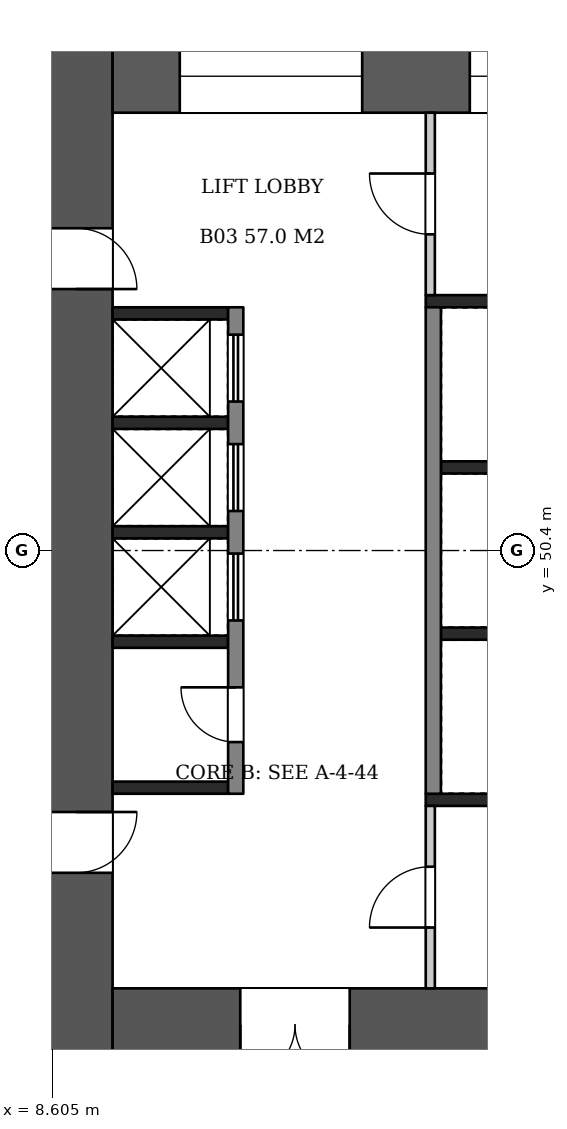
"""IFC4 building model, lengths in metres.
Left out: names, types, materials, properties, quantities, classifications, styles, units other than length and angle.
Written with IfcOpenShell. Run it as: python <this file> out.ifc"""

import sys

from ifc_helpers import new_model, si_unit, direction, frame, frame_2d, origin, place, context, subcontext, project, spatial, rectangle, extrude, element, fill, save


model = new_model("IFC4")
c1 = context("Model", 3, precision=1e-05, world=origin(), true_north=direction((0.0, 1.0)))
c2 = subcontext(c1, "Body", "Model", "MODEL_VIEW")
j1 = project(units=[si_unit("LENGTHUNIT", "METRE"), si_unit("PLANEANGLEUNIT", "RADIAN")], contexts=[c1])
p1 = place(None, origin())
s1 = spatial("IfcSite", under=j1, at=p1, CompositionType="ELEMENT")
p2 = place(p1, origin())
s2 = spatial("IfcBuilding", under=s1, at=p2, CompositionType="ELEMENT")
p3 = place(p2, frame((0.0, 0.0, 19.8)))
s3 = spatial("IfcBuildingStorey", under=s2, at=p3, CompositionType="ELEMENT", Elevation=19.8)
p4 = place(p3, frame((9.0, 58.8, 0.0), z_axis=(0.0, 0.0, 1.0), x_axis=(0.0, -1.0, 0.0)))
e1 = element("IfcWall", 1, at=p4, inside=s3, PredefinedType="SHEAR", context=c2, shape_type="SweptSolid", body=[
    extrude(rectangle(XDim=16.8, YDim=1.2, at=frame_2d((8.4, 0.0))), origin(), (0.0, 0.0, 1.0), 5.12),
])
p5 = place(p4, frame((3.1, 0.0, 0.0)))
e2 = element("IfcOpeningElement", 2, at=p5, cuts=e1, PredefinedType="OPENING", context=c2, shape_type="SweptSolid", body=[
    extrude(rectangle(XDim=1.0, YDim=2.1, at=frame_2d((0.5, 1.05))), frame((0.0, 0.61, 0.0), z_axis=(0.0, -1.0, 0.0), x_axis=(1.0, 0.0, 0.0)), (0.0, 0.0, 1.0), 1.22),
])
p6 = place(p4, frame((12.7, 0.0, 0.0)))
e3 = element("IfcOpeningElement", 3, at=p6, cuts=e1, PredefinedType="OPENING", context=c2, shape_type="SweptSolid", body=[
    extrude(rectangle(XDim=1.0, YDim=2.1, at=frame_2d((0.5, 1.05))), frame((0.0, 0.61, 0.0), z_axis=(0.0, -1.0, 0.0), x_axis=(1.0, 0.0, 0.0)), (0.0, 0.0, 1.0), 1.22),
])
p7 = place(p3, frame((9.6, 58.2, 0.0), z_axis=(0.0, 0.0, 1.0), x_axis=(1.0, 0.0, 0.0)))
e4 = element("IfcWall", 4, at=p7, inside=s3, PredefinedType="SHEAR", context=c2, shape_type="SweptSolid", body=[
    extrude(rectangle(XDim=14.4, YDim=1.2, at=frame_2d((7.2, 0.0))), origin(), (0.0, 0.0, 1.0), 5.12),
])
p8 = place(p7, frame((1.105, 0.0, 0.6)))
e5 = element("IfcOpeningElement", 5, at=p8, cuts=e4, PredefinedType="OPENING", context=c2, shape_type="SweptSolid", body=[
    extrude(rectangle(XDim=3.0, YDim=2.1, at=frame_2d((1.5, 1.05))), frame((0.0, 0.61, 0.0), z_axis=(0.0, -1.0, 0.0), x_axis=(1.0, 0.0, 0.0)), (0.0, 0.0, 1.0), 1.22),
])
p9 = place(p7, frame((5.875, 0.0, 0.6)))
e6 = element("IfcOpeningElement", 6, at=p9, cuts=e4, PredefinedType="OPENING", context=c2, shape_type="SweptSolid", body=[
    extrude(rectangle(XDim=2.4, YDim=2.1, at=frame_2d((1.2, 1.05))), frame((0.0, 0.61, 0.0), z_axis=(0.0, -1.0, 0.0), x_axis=(1.0, 0.0, 0.0)), (0.0, 0.0, 1.0), 1.22),
])
p10 = place(p7, frame((9.993, 0.0, 0.5)))
e7 = element("IfcOpeningElement", 7, at=p10, cuts=e4, PredefinedType="OPENING", context=c2, shape_type="SweptSolid", body=[
    extrude(rectangle(XDim=1.2, YDim=2.4, at=frame_2d((0.6, 1.2))), frame((0.0, 0.61, 0.0), z_axis=(0.0, -1.0, 0.0), x_axis=(1.0, 0.0, 0.0)), (0.0, 0.0, 1.0), 1.22),
])
p11 = place(p7, frame((12.197, 0.0, 0.5)))
e8 = element("IfcOpeningElement", 8, at=p11, cuts=e4, PredefinedType="OPENING", context=c2, shape_type="SweptSolid", body=[
    extrude(rectangle(XDim=1.2, YDim=2.4, at=frame_2d((0.6, 1.2))), frame((0.0, 0.61, 0.0), z_axis=(0.0, -1.0, 0.0), x_axis=(1.0, 0.0, 0.0)), (0.0, 0.0, 1.0), 1.22),
])
p12 = place(p3, frame((9.6, 42.6, 0.0), z_axis=(0.0, 0.0, 1.0), x_axis=(1.0, 0.0, 0.0)))
e9 = element("IfcWall", 9, at=p12, inside=s3, PredefinedType="SHEAR", context=c2, shape_type="SweptSolid", body=[
    extrude(rectangle(XDim=14.4, YDim=1.2, at=frame_2d((7.2, 0.0))), origin(), (0.0, 0.0, 1.0), 5.12),
])
p13 = place(p12, frame((2.1, 0.0, 0.0)))
e10 = element("IfcOpeningElement", 10, at=p13, cuts=e9, PredefinedType="OPENING", context=c2, shape_type="SweptSolid", body=[
    extrude(rectangle(XDim=1.8, YDim=2.1, at=frame_2d((0.9, 1.05))), frame((0.0, 0.61, 0.0), z_axis=(0.0, -1.0, 0.0), x_axis=(1.0, 0.0, 0.0)), (0.0, 0.0, 1.0), 1.22),
])
for number, where, z_axis, x_axis in (
    (11, (9.6, 54.3, 0.0), (0.0, 0.0, 1.0), (1.0, 0.0, 0.0)),
    (12, (9.6, 52.5, 0.0), (0.0, 0.0, 1.0), (1.0, 0.0, 0.0)),
    (13, (9.6, 50.7, 0.0), (0.0, 0.0, 1.0), (1.0, 0.0, 0.0)),
    (14, (9.6, 48.9, 0.0), (0.0, 0.0, 1.0), (1.0, 0.0, 0.0)),
    (15, (9.6, 46.5, 0.0), (0.0, 0.0, 1.0), (1.0, 0.0, 0.0)),
):
    element("IfcWall", number, at=place(p3, frame(where, z_axis=z_axis, x_axis=x_axis)), inside=s3, PredefinedType="SHEAR", context=c2, shape_type="SweptSolid", body=[
        extrude(rectangle(XDim=1.9, YDim=0.2, at=frame_2d((0.95, 0.0))), origin(), (0.0, 0.0, 1.0), 5.12),
    ])
p14 = place(p3, frame((11.625, 54.4, 0.0), z_axis=(0.0, 0.0, 1.0), x_axis=(0.0, -1.0, 0.0)))
e16 = element("IfcWall", 16, at=p14, inside=s3, PredefinedType="SHEAR", context=c2, shape_type="SweptSolid", body=[
    extrude(rectangle(XDim=8.0, YDim=0.25, at=frame_2d((4.0, 0.0))), origin(), (0.0, 0.0, 1.0), 5.12),
])
p15 = place(p14, frame((0.45, 0.0, 0.0)))
e17 = element("IfcOpeningElement", 17, at=p15, cuts=e16, PredefinedType="OPENING", context=c2, shape_type="SweptSolid", body=[
    extrude(rectangle(XDim=1.1, YDim=2.1, at=frame_2d((0.55, 1.05))), frame((0.0, 0.135, 0.0), z_axis=(0.0, -1.0, 0.0), x_axis=(1.0, 0.0, 0.0)), (0.0, 0.0, 1.0), 0.27),
])
p16 = place(p14, frame((2.25, 0.0, 0.0)))
e18 = element("IfcOpeningElement", 18, at=p16, cuts=e16, PredefinedType="OPENING", context=c2, shape_type="SweptSolid", body=[
    extrude(rectangle(XDim=1.1, YDim=2.1, at=frame_2d((0.55, 1.05))), frame((0.0, 0.135, 0.0), z_axis=(0.0, -1.0, 0.0), x_axis=(1.0, 0.0, 0.0)), (0.0, 0.0, 1.0), 0.27),
])
p17 = place(p14, frame((4.05, 0.0, 0.0)))
e19 = element("IfcOpeningElement", 19, at=p17, cuts=e16, PredefinedType="OPENING", context=c2, shape_type="SweptSolid", body=[
    extrude(rectangle(XDim=1.1, YDim=2.1, at=frame_2d((0.55, 1.05))), frame((0.0, 0.135, 0.0), z_axis=(0.0, -1.0, 0.0), x_axis=(1.0, 0.0, 0.0)), (0.0, 0.0, 1.0), 0.27),
])
p18 = place(p14, frame((6.25, 0.0, 0.0)))
e20 = element("IfcOpeningElement", 20, at=p18, cuts=e16, PredefinedType="OPENING", context=c2, shape_type="SweptSolid", body=[
    extrude(rectangle(XDim=0.9, YDim=2.1, at=frame_2d((0.45, 1.05))), frame((0.0, 0.135, 0.0), z_axis=(0.0, -1.0, 0.0), x_axis=(1.0, 0.0, 0.0)), (0.0, 0.0, 1.0), 0.27),
])
for number, where, z_axis, x_axis in (
    (21, (15.0, 51.767, 0.0), (0.0, 0.0, 1.0), (1.0, 0.0, 0.0)),
    (22, (15.0, 49.033, 0.0), (0.0, 0.0, 1.0), (1.0, 0.0, 0.0)),
):
    element("IfcWall", number, at=place(p3, frame(where, z_axis=z_axis, x_axis=x_axis)), inside=s3, PredefinedType="SHEAR", context=c2, shape_type="SweptSolid", body=[
        extrude(rectangle(XDim=1.9, YDim=0.2, at=frame_2d((0.95, 0.0))), origin(), (0.0, 0.0, 1.0), 5.12),
    ])
p19 = place(p3, frame((14.875, 54.4, 0.0), z_axis=(0.0, 0.0, 1.0), x_axis=(0.0, -1.0, 0.0)))
e23 = element("IfcWall", 23, at=p19, inside=s3, PredefinedType="SHEAR", context=c2, shape_type="SweptSolid", body=[
    extrude(rectangle(XDim=8.0, YDim=0.25, at=frame_2d((4.0, 0.0))), origin(), (0.0, 0.0, 1.0), 5.12),
])
p20 = place(p3, frame((14.75, 54.5, 0.0), z_axis=(0.0, 0.0, 1.0), x_axis=(1.0, 0.0, 0.0)))
e24 = element("IfcWall", 24, at=p20, inside=s3, PredefinedType="SHEAR", context=c2, shape_type="SweptSolid", body=[
    extrude(rectangle(XDim=2.4, YDim=0.2, at=frame_2d((1.2, 0.0))), origin(), (0.0, 0.0, 1.0), 5.12),
])
p21 = place(p3, frame((14.825, 57.6, 0.0), z_axis=(0.0, 0.0, 1.0), x_axis=(0.0, -1.0, 0.0)))
e25 = element("IfcWall", 25, at=p21, inside=s3, PredefinedType="PARTITIONING", context=c2, shape_type="SweptSolid", body=[
    extrude(rectangle(XDim=3.0, YDim=0.15, at=frame_2d((1.5, 0.0))), origin(), (0.0, 0.0, 1.0), 5.12),
])
p22 = place(p21, frame((1.0, 0.0, 0.0)))
e26 = element("IfcOpeningElement", 26, at=p22, cuts=e25, PredefinedType="OPENING", context=c2, shape_type="SweptSolid", body=[
    extrude(rectangle(XDim=1.0, YDim=2.1, at=frame_2d((0.5, 1.05))), frame((0.0, 0.085, 0.0), z_axis=(0.0, -1.0, 0.0), x_axis=(1.0, 0.0, 0.0)), (0.0, 0.0, 1.0), 0.17),
])
p23 = place(p3, frame((14.75, 46.3, 0.0), z_axis=(0.0, 0.0, 1.0), x_axis=(1.0, 0.0, 0.0)))
e27 = element("IfcWall", 27, at=p23, inside=s3, PredefinedType="SHEAR", context=c2, shape_type="SweptSolid", body=[
    extrude(rectangle(XDim=2.4, YDim=0.2, at=frame_2d((1.2, 0.0))), origin(), (0.0, 0.0, 1.0), 5.12),
])
p24 = place(p3, frame((14.825, 46.2, 0.0), z_axis=(0.0, 0.0, 1.0), x_axis=(0.0, -1.0, 0.0)))
e28 = element("IfcWall", 28, at=p24, inside=s3, PredefinedType="PARTITIONING", context=c2, shape_type="SweptSolid", body=[
    extrude(rectangle(XDim=3.0, YDim=0.15, at=frame_2d((1.5, 0.0))), origin(), (0.0, 0.0, 1.0), 5.12),
])
p25 = place(p24, frame((1.0, 0.0, 0.0)))
e29 = element("IfcOpeningElement", 29, at=p25, cuts=e28, PredefinedType="OPENING", context=c2, shape_type="SweptSolid", body=[
    extrude(rectangle(XDim=1.0, YDim=2.1, at=frame_2d((0.5, 1.05))), frame((0.0, 0.085, 0.0), z_axis=(0.0, -1.0, 0.0), x_axis=(1.0, 0.0, 0.0)), (0.0, 0.0, 1.0), 0.17),
])
p26 = place(p5, origin())
e30 = element("IfcDoor", 30, at=p26, inside=s3, OperationType="SINGLE_SWING_RIGHT", PredefinedType="DOOR", context=c2, shape_type="SweptSolid", body=[
    extrude(rectangle(XDim=1.0, YDim=2.1, at=frame_2d((0.5, 1.05))), frame((0.0, 0.025, 0.0), z_axis=(0.0, -1.0, 0.0), x_axis=(1.0, 0.0, 0.0)), (0.0, 0.0, 1.0), 0.05),
])
fill(e2, e30)
p27 = place(p6, origin())
e31 = element("IfcDoor", 31, at=p27, inside=s3, OperationType="SINGLE_SWING_LEFT", PredefinedType="DOOR", context=c2, shape_type="SweptSolid", body=[
    extrude(rectangle(XDim=1.0, YDim=2.1, at=frame_2d((0.5, 1.05))), frame((0.0, 0.025, 0.0), z_axis=(0.0, -1.0, 0.0), x_axis=(1.0, 0.0, 0.0)), (0.0, 0.0, 1.0), 0.05),
])
fill(e3, e31)
p28 = place(p13, frame((1.8, 0.0, 0.0), z_axis=(0.0, 0.0, 1.0), x_axis=(-1.0, 0.0, 0.0)))
e32 = element("IfcDoor", 32, at=p28, inside=s3, OperationType="DOUBLE_DOOR_SINGLE_SWING", PredefinedType="DOOR", context=c2, shape_type="SweptSolid", body=[
    extrude(rectangle(XDim=1.8, YDim=2.1, at=frame_2d((0.9, 1.05))), frame((0.0, 0.025, 0.0), z_axis=(0.0, -1.0, 0.0), x_axis=(1.0, 0.0, 0.0)), (0.0, 0.0, 1.0), 0.05),
])
fill(e10, e32)
p29 = place(p15, origin())
e33 = element("IfcDoor", 33, at=p29, inside=s3, OperationType="DOUBLE_DOOR_SLIDING", PredefinedType="DOOR", context=c2, shape_type="SweptSolid", body=[
    extrude(rectangle(XDim=1.1, YDim=2.1, at=frame_2d((0.55, 1.05))), frame((0.0, 0.025, 0.0), z_axis=(0.0, -1.0, 0.0), x_axis=(1.0, 0.0, 0.0)), (0.0, 0.0, 1.0), 0.05),
])
fill(e17, e33)
p30 = place(p16, origin())
e34 = element("IfcDoor", 34, at=p30, inside=s3, OperationType="DOUBLE_DOOR_SLIDING", PredefinedType="DOOR", context=c2, shape_type="SweptSolid", body=[
    extrude(rectangle(XDim=1.1, YDim=2.1, at=frame_2d((0.55, 1.05))), frame((0.0, 0.025, 0.0), z_axis=(0.0, -1.0, 0.0), x_axis=(1.0, 0.0, 0.0)), (0.0, 0.0, 1.0), 0.05),
])
fill(e18, e34)
p31 = place(p17, origin())
e35 = element("IfcDoor", 35, at=p31, inside=s3, OperationType="DOUBLE_DOOR_SLIDING", PredefinedType="DOOR", context=c2, shape_type="SweptSolid", body=[
    extrude(rectangle(XDim=1.1, YDim=2.1, at=frame_2d((0.55, 1.05))), frame((0.0, 0.025, 0.0), z_axis=(0.0, -1.0, 0.0), x_axis=(1.0, 0.0, 0.0)), (0.0, 0.0, 1.0), 0.05),
])
fill(e19, e35)
p32 = place(p18, frame((0.9, 0.0, 0.0), z_axis=(0.0, 0.0, 1.0), x_axis=(-1.0, 0.0, 0.0)))
e36 = element("IfcDoor", 36, at=p32, inside=s3, OperationType="SINGLE_SWING_RIGHT", PredefinedType="DOOR", context=c2, shape_type="SweptSolid", body=[
    extrude(rectangle(XDim=0.9, YDim=2.1, at=frame_2d((0.45, 1.05))), frame((0.0, 0.025, 0.0), z_axis=(0.0, -1.0, 0.0), x_axis=(1.0, 0.0, 0.0)), (0.0, 0.0, 1.0), 0.05),
])
fill(e20, e36)
p33 = place(p22, frame((1.0, 0.0, 0.0), z_axis=(0.0, 0.0, 1.0), x_axis=(-1.0, 0.0, 0.0)))
e37 = element("IfcDoor", 37, at=p33, inside=s3, OperationType="SINGLE_SWING_RIGHT", PredefinedType="DOOR", context=c2, shape_type="SweptSolid", body=[
    extrude(rectangle(XDim=1.0, YDim=2.1, at=frame_2d((0.5, 1.05))), frame((0.0, 0.025, 0.0), z_axis=(0.0, -1.0, 0.0), x_axis=(1.0, 0.0, 0.0)), (0.0, 0.0, 1.0), 0.05),
])
fill(e26, e37)
p34 = place(p25, frame((1.0, 0.0, 0.0), z_axis=(0.0, 0.0, 1.0), x_axis=(-1.0, 0.0, 0.0)))
e38 = element("IfcDoor", 38, at=p34, inside=s3, OperationType="SINGLE_SWING_LEFT", PredefinedType="DOOR", context=c2, shape_type="SweptSolid", body=[
    extrude(rectangle(XDim=1.0, YDim=2.1, at=frame_2d((0.5, 1.05))), frame((0.0, 0.025, 0.0), z_axis=(0.0, -1.0, 0.0), x_axis=(1.0, 0.0, 0.0)), (0.0, 0.0, 1.0), 0.05),
])
fill(e29, e38)
p35 = place(p8, origin())
e39 = element("IfcWindow", 39, at=p35, inside=s3, PartitioningType="SINGLE_PANEL", PredefinedType="WINDOW", context=c2, shape_type="SweptSolid", body=[
    extrude(rectangle(XDim=3.0, YDim=2.1, at=frame_2d((1.5, 1.05))), frame((0.0, 0.03, 0.0), z_axis=(0.0, -1.0, 0.0), x_axis=(1.0, 0.0, 0.0)), (0.0, 0.0, 1.0), 0.06),
])
fill(e5, e39)
p36 = place(p9, origin())
e40 = element("IfcWindow", 40, at=p36, inside=s3, PartitioningType="SINGLE_PANEL", PredefinedType="WINDOW", context=c2, shape_type="SweptSolid", body=[
    extrude(rectangle(XDim=2.4, YDim=2.1, at=frame_2d((1.2, 1.05))), frame((0.0, 0.03, 0.0), z_axis=(0.0, -1.0, 0.0), x_axis=(1.0, 0.0, 0.0)), (0.0, 0.0, 1.0), 0.06),
])
fill(e6, e40)
save(model, sys.argv[1])
